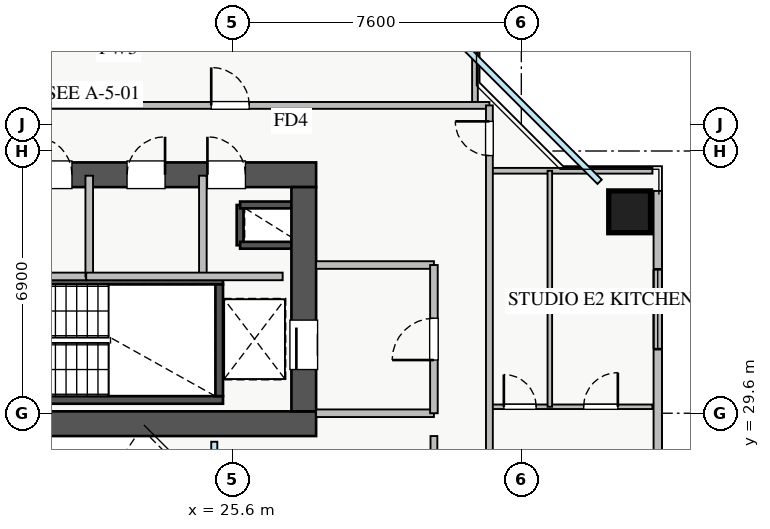
"""IFC4 building model, lengths in metres.
Left out: names, types, materials, properties, quantities, classifications, styles, units other than length and angle.
Written with IfcOpenShell. Run it as: python <this file> out.ifc"""

import sys

from ifc_helpers import new_model, si_unit, direction, frame, frame_2d, origin, origin_2d, place, context, subcontext, project, spatial, rectangle, extrude, source, transform, mapped, element, fill, save


model = new_model("IFC4")
c1 = context("Model", 3, precision=1e-05, world=origin(), true_north=direction((0.0, 1.0)))
c2 = subcontext(c1, "Body", "Model", "MODEL_VIEW")
j1 = project(units=[si_unit("LENGTHUNIT", "METRE"), si_unit("PLANEANGLEUNIT", "RADIAN")], contexts=[c1])
p1 = place(None, origin())
s1 = spatial("IfcSite", under=j1, at=p1, CompositionType="ELEMENT")
p2 = place(p1, origin())
s2 = spatial("IfcBuilding", under=s1, at=p2, CompositionType="ELEMENT")
p3 = place(p2, frame((0.0, 0.0, 106.75)))
s3 = spatial("IfcBuildingStorey", under=s2, at=p3, CompositionType="ELEMENT", Elevation=106.75)
p4 = place(p3, frame((25.8, 34.02, 0.0), z_axis=(0.0, 0.0, 1.0), x_axis=(0.0, 1.0, 0.0)))
e1 = element("IfcWall", 1, at=p4, inside=s3, PredefinedType="SHEAR", context=c2, shape_type="SweptSolid", body=[
    extrude(rectangle(XDim=1.06, YDim=0.18, at=frame_2d((0.53, 0.0))), origin(), (0.0, 0.0, 1.0), 3.07),
])
for number, where, z_axis, x_axis in (
    (2, (25.8, 35.08, 0.0), (0.0, 0.0, 1.0), (1.0, 0.0, 0.0)),
    (3, (25.8, 34.02, 0.0), (0.0, 0.0, 1.0), (1.0, 0.0, 0.0)),
):
    element("IfcWall", number, at=place(p3, frame(where, z_axis=z_axis, x_axis=x_axis)), inside=s3, PredefinedType="SHEAR", context=c2, shape_type="SweptSolid", body=[
        extrude(rectangle(XDim=1.35, YDim=0.18, at=frame_2d((0.675, 0.0))), origin(), (0.0, 0.0, 1.0), 3.07),
    ])
p5 = place(p3, frame((18.2, 29.95, 0.0), z_axis=(0.0, 0.0, 1.0), x_axis=(1.0, 0.0, 0.0)))
e4 = element("IfcWall", 4, at=p5, inside=s3, PredefinedType="SHEAR", context=c2, shape_type="SweptSolid", body=[
    extrude(rectangle(XDim=7.15, YDim=0.2, at=frame_2d((3.575, 0.0))), origin(), (0.0, 0.0, 1.0), 3.25),
])
p6 = place(p3, frame((18.2, 33.09, 0.0), z_axis=(0.0, 0.0, 1.0), x_axis=(1.0, 0.0, 0.0)))
e5 = element("IfcWall", 5, at=p6, inside=s3, PredefinedType="SHEAR", context=c2, shape_type="SweptSolid", body=[
    extrude(rectangle(XDim=7.15, YDim=0.2, at=frame_2d((3.575, 0.0))), origin(), (0.0, 0.0, 1.0), 3.25),
])
p7 = place(p6, frame((0.35, 0.0, 0.0)))
e6 = element("IfcOpeningElement", 6, at=p7, cuts=e5, PredefinedType="OPENING", context=c2, shape_type="SweptSolid", body=[
    extrude(rectangle(XDim=1.1, YDim=2.05, at=frame_2d((0.55, 1.025))), frame((0.0, 0.11, 0.0), z_axis=(0.0, -1.0, 0.0), x_axis=(1.0, 0.0, 0.0)), (0.0, 0.0, 1.0), 0.22),
])
p8 = place(p3, frame((25.25, 30.05, 0.0), z_axis=(0.0, 0.0, 1.0), x_axis=(0.0, 1.0, 0.0)))
e7 = element("IfcWall", 7, at=p8, inside=s3, PredefinedType="SHEAR", context=c2, shape_type="SweptSolid", body=[
    extrude(rectangle(XDim=2.94, YDim=0.2, at=frame_2d((1.47, 0.0))), origin(), (0.0, 0.0, 1.0), 3.25),
])
p9 = place(p3, frame((10.2, 29.325, 0.0), z_axis=(0.0, 0.0, 1.0), x_axis=(1.0, 0.0, 0.0)))
e8 = element("IfcWall", 8, at=p9, inside=s3, PredefinedType="SHEAR", context=c2, shape_type="SweptSolid", body=[
    extrude(rectangle(XDim=17.6, YDim=0.65, at=frame_2d((8.8, 0.0))), origin(), (0.0, 0.0, 1.0), 3.25),
])
p10 = place(p3, frame((10.2, 35.875, 0.0), z_axis=(0.0, 0.0, 1.0), x_axis=(1.0, 0.0, 0.0)))
e9 = element("IfcWall", 9, at=p10, inside=s3, PredefinedType="SHEAR", context=c2, shape_type="SweptSolid", body=[
    extrude(rectangle(XDim=17.6, YDim=0.65, at=frame_2d((8.8, 0.0))), origin(), (0.0, 0.0, 1.0), 3.25),
])
p11 = place(p10, frame((1.15, 0.0, 0.0)))
e10 = element("IfcOpeningElement", 10, at=p11, cuts=e9, PredefinedType="OPENING", context=c2, shape_type="SweptSolid", body=[
    extrude(rectangle(XDim=1.1, YDim=2.05, at=frame_2d((0.55, 1.025))), frame((0.0, 0.335, 0.0), z_axis=(0.0, -1.0, 0.0), x_axis=(1.0, 0.0, 0.0)), (0.0, 0.0, 1.0), 0.67),
])
p12 = place(p10, frame((8.3, 0.0, 0.0)))
e11 = element("IfcOpeningElement", 11, at=p12, cuts=e9, PredefinedType="OPENING", context=c2, shape_type="SweptSolid", body=[
    extrude(rectangle(XDim=1.1, YDim=2.05, at=frame_2d((0.55, 1.025))), frame((0.0, 0.335, 0.0), z_axis=(0.0, -1.0, 0.0), x_axis=(1.0, 0.0, 0.0)), (0.0, 0.0, 1.0), 0.67),
])
p13 = place(p10, frame((4.9, 0.0, 0.0)))
e12 = element("IfcOpeningElement", 12, at=p13, cuts=e9, PredefinedType="OPENING", context=c2, shape_type="SweptSolid", body=[
    extrude(rectangle(XDim=1.1, YDim=2.05, at=frame_2d((0.55, 1.025))), frame((0.0, 0.335, 0.0), z_axis=(0.0, -1.0, 0.0), x_axis=(1.0, 0.0, 0.0)), (0.0, 0.0, 1.0), 0.67),
])
p14 = place(p10, frame((14.74, 0.0, 0.0)))
e13 = element("IfcOpeningElement", 13, at=p14, cuts=e9, PredefinedType="OPENING", context=c2, shape_type="SweptSolid", body=[
    extrude(rectangle(XDim=1.0, YDim=2.05, at=frame_2d((0.5, 1.025))), frame((0.0, 0.335, 0.0), z_axis=(0.0, -1.0, 0.0), x_axis=(1.0, 0.0, 0.0)), (0.0, 0.0, 1.0), 0.67),
])
p15 = place(p10, frame((10.175, 0.0, 0.0)))
e14 = element("IfcOpeningElement", 14, at=p15, cuts=e9, PredefinedType="OPENING", context=c2, shape_type="SweptSolid", body=[
    extrude(rectangle(XDim=1.0, YDim=2.05, at=frame_2d((0.5, 1.025))), frame((0.0, 0.335, 0.0), z_axis=(0.0, -1.0, 0.0), x_axis=(1.0, 0.0, 0.0)), (0.0, 0.0, 1.0), 0.67),
])
p16 = place(p10, frame((12.625, 0.0, 0.0)))
e15 = element("IfcOpeningElement", 15, at=p16, cuts=e9, PredefinedType="OPENING", context=c2, shape_type="SweptSolid", body=[
    extrude(rectangle(XDim=1.0, YDim=2.05, at=frame_2d((0.5, 1.025))), frame((0.0, 0.335, 0.0), z_axis=(0.0, -1.0, 0.0), x_axis=(1.0, 0.0, 0.0)), (0.0, 0.0, 1.0), 0.67),
])
p17 = place(p3, frame((27.475, 29.65, 0.0), z_axis=(0.0, 0.0, 1.0), x_axis=(0.0, 1.0, 0.0)))
e16 = element("IfcWall", 16, at=p17, inside=s3, PredefinedType="SHEAR", context=c2, shape_type="SweptSolid", body=[
    extrude(rectangle(XDim=5.9, YDim=0.65, at=frame_2d((2.95, 0.0))), origin(), (0.0, 0.0, 1.0), 3.25),
])
p18 = place(p17, frame((1.1, 0.0, 0.0)))
e17 = element("IfcOpeningElement", 17, at=p18, cuts=e16, PredefinedType="OPENING", context=c2, shape_type="SweptSolid", body=[
    extrude(rectangle(XDim=1.3, YDim=2.05, at=frame_2d((0.65, 1.025))), frame((0.0, 0.335, 0.0), z_axis=(0.0, -1.0, 0.0), x_axis=(1.0, 0.0, 0.0)), (0.0, 0.0, 1.0), 0.67),
])
m1 = source(origin(), c2, "Body", "SweptSolid", [
    extrude(rectangle(XDim=1.1, YDim=1.1, at=origin_2d()), origin(), (0.0, 0.0, 1.0), 3.25),
])
p19 = place(p3, frame((36.05, 34.9, 0.0), z_axis=(0.0, 0.0, 1.0), x_axis=(1.0, 0.0, 0.0)))
e18 = element("IfcColumn", 18, at=p19, inside=s3, PredefinedType="COLUMN", context=c2, shape_type="MappedRepresentation", body=[
    mapped(m1, transform((0.0, 0.0, 0.0), x_axis=(1.0, 0.0, 0.0), y_axis=(0.0, 1.0, 0.0), z_axis=(0.0, 0.0, 1.0), scale=1.0)),
])
p20 = place(p3, frame((36.79, 10.55, 0.0), z_axis=(0.0, 0.0, 1.0), x_axis=(0.0, 1.0, 0.0)))
e19 = element("IfcWall", 19, at=p20, inside=s3, PredefinedType="STANDARD", context=c2, shape_type="SweptSolid", body=[
    extrude(rectangle(XDim=24.9, YDim=0.22, at=frame_2d((12.45, 0.0))), origin(), (0.0, 0.0, 1.0), 2.61),
])
p21 = place(p20, frame((13.3, 0.0, 0.0)))
e20 = element("IfcOpeningElement", 20, at=p21, cuts=e19, PredefinedType="OPENING", context=c2, shape_type="SweptSolid", body=[
    extrude(rectangle(XDim=1.2, YDim=2.1, at=frame_2d((0.6, 1.05))), frame((0.0, 0.12, 0.0), z_axis=(0.0, -1.0, 0.0), x_axis=(1.0, 0.0, 0.0)), (0.0, 0.0, 1.0), 0.24),
])
p22 = place(p20, frame((1.912, 0.0, 0.9)))
e21 = element("IfcOpeningElement", 21, at=p22, cuts=e19, PredefinedType="OPENING", context=c2, shape_type="SweptSolid", body=[
    extrude(rectangle(XDim=2.4, YDim=1.48, at=frame_2d((1.2, 0.74))), frame((0.0, 0.12, 0.0), z_axis=(0.0, -1.0, 0.0), x_axis=(1.0, 0.0, 0.0)), (0.0, 0.0, 1.0), 0.24),
])
p23 = place(p20, frame((20.737, 0.0, 0.9)))
e22 = element("IfcOpeningElement", 22, at=p23, cuts=e19, PredefinedType="OPENING", context=c2, shape_type="SweptSolid", body=[
    extrude(rectangle(XDim=2.1, YDim=1.48, at=frame_2d((1.05, 0.74))), frame((0.0, 0.12, 0.0), z_axis=(0.0, -1.0, 0.0), x_axis=(1.0, 0.0, 0.0)), (0.0, 0.0, 1.0), 0.24),
])
p24 = place(p20, frame((12.165, 0.0, 0.9)))
e23 = element("IfcOpeningElement", 23, at=p24, cuts=e19, PredefinedType="OPENING", context=c2, shape_type="SweptSolid", body=[
    extrude(rectangle(XDim=0.9, YDim=1.2, at=frame_2d((0.45, 0.6))), frame((0.0, 0.12, 0.0), z_axis=(0.0, -1.0, 0.0), x_axis=(1.0, 0.0, 0.0)), (0.0, 0.0, 1.0), 0.24),
])
for number, where, z_axis, x_axis in (
    (24, (27.8, 29.6, 0.0), (0.0, 0.0, 1.0), (1.0, 0.0, 0.0)),
    (25, (27.8, 33.5, 0.0), (0.0, 0.0, 1.0), (1.0, 0.0, 0.0)),
):
    element("IfcWall", number, at=place(p3, frame(where, z_axis=z_axis, x_axis=x_axis)), inside=s3, PredefinedType="PARTITIONING", context=c2, shape_type="SweptSolid", body=[
        extrude(rectangle(XDim=3.1, YDim=0.2, at=frame_2d((1.55, 0.0))), origin(), (0.0, 0.0, 1.0), 3.07),
    ])
p25 = place(p3, frame((30.9, 29.6, 0.0), z_axis=(0.0, 0.0, 1.0), x_axis=(0.0, 1.0, 0.0)))
e26 = element("IfcWall", 26, at=p25, inside=s3, PredefinedType="PARTITIONING", context=c2, shape_type="SweptSolid", body=[
    extrude(rectangle(XDim=3.9, YDim=0.2, at=frame_2d((1.95, 0.0))), origin(), (0.0, 0.0, 1.0), 3.07),
])
p26 = place(p25, frame((1.4, 0.0, 0.0)))
e27 = element("IfcOpeningElement", 27, at=p26, cuts=e26, PredefinedType="OPENING", context=c2, shape_type="SweptSolid", body=[
    extrude(rectangle(XDim=1.1, YDim=2.05, at=frame_2d((0.55, 1.025))), frame((0.0, 0.11, 0.0), z_axis=(0.0, -1.0, 0.0), x_axis=(1.0, 0.0, 0.0)), (0.0, 0.0, 1.0), 0.22),
])
p27 = place(p3, frame((24.82, 33.2, 0.0), z_axis=(0.0, 0.0, 1.0), x_axis=(0.0, 1.0, 0.0)))
e28 = element("IfcWall", 28, at=p27, inside=s3, PredefinedType="PARTITIONING", context=c2, shape_type="SweptSolid", body=[
    extrude(rectangle(XDim=2.65, YDim=0.2, at=frame_2d((1.325, 0.0))), origin(), (0.0, 0.0, 1.0), 3.07),
])
p28 = place(p3, frame((19.88, 33.2, 0.0), z_axis=(0.0, 0.0, 1.0), x_axis=(1.0, 0.0, 0.0)))
e29 = element("IfcWall", 29, at=p28, inside=s3, PredefinedType="PARTITIONING", context=c2, shape_type="SweptSolid", body=[
    extrude(rectangle(XDim=1.87, YDim=0.2, at=frame_2d((0.935, 0.0))), origin(), (0.0, 0.0, 1.0), 3.07),
])
p29 = place(p3, frame((21.83, 33.2, 0.0), z_axis=(0.0, 0.0, 1.0), x_axis=(0.0, 1.0, 0.0)))
e30 = element("IfcWall", 30, at=p29, inside=s3, PredefinedType="PARTITIONING", context=c2, shape_type="SweptSolid", body=[
    extrude(rectangle(XDim=2.65, YDim=0.2, at=frame_2d((1.325, 0.0))), origin(), (0.0, 0.0, 1.0), 3.07),
])
p30 = place(p3, frame((21.75, 33.2, 0.0), z_axis=(0.0, 0.0, 1.0), x_axis=(1.0, 0.0, 0.0)))
e31 = element("IfcWall", 31, at=p30, inside=s3, PredefinedType="PARTITIONING", context=c2, shape_type="SweptSolid", body=[
    extrude(rectangle(XDim=5.17, YDim=0.2, at=frame_2d((2.585, 0.0))), origin(), (0.0, 0.0, 1.0), 3.07),
])
p31 = place(p3, frame((31.98, 37.7, 0.0), z_axis=(0.0, 0.0, 1.0), x_axis=(0.0, 1.0, 0.0)))
e32 = element("IfcWall", 32, at=p31, inside=s3, PredefinedType="PARTITIONING", context=c2, shape_type="SweptSolid", body=[
    extrude(rectangle(XDim=2.95, YDim=0.15, at=frame_2d((1.475, 0.0))), origin(), (0.0, 0.0, 1.0), 3.07),
])
p32 = place(p3, frame((8.75, 37.7, 0.0), z_axis=(0.0, 0.0, 1.0), x_axis=(1.0, 0.0, 0.0)))
e33 = element("IfcWall", 33, at=p32, inside=s3, PredefinedType="PARTITIONING", context=c2, shape_type="SweptSolid", body=[
    extrude(rectangle(XDim=23.61, YDim=0.18, at=frame_2d((11.805, 0.0))), origin(), (0.0, 0.0, 1.0), 3.07),
])
p33 = place(p32, frame((4.675, 0.0, 0.0)))
e34 = element("IfcOpeningElement", 34, at=p33, cuts=e33, PredefinedType="OPENING", context=c2, shape_type="SweptSolid", body=[
    extrude(rectangle(XDim=1.0, YDim=2.05, at=frame_2d((0.5, 1.025))), frame((0.0, 0.1, 0.0), z_axis=(0.0, -1.0, 0.0), x_axis=(1.0, 0.0, 0.0)), (0.0, 0.0, 1.0), 0.2),
])
p34 = place(p32, frame((16.29, 0.0, 0.0)))
e35 = element("IfcOpeningElement", 35, at=p34, cuts=e33, PredefinedType="OPENING", context=c2, shape_type="SweptSolid", body=[
    extrude(rectangle(XDim=1.0, YDim=2.05, at=frame_2d((0.5, 1.025))), frame((0.0, 0.1, 0.0), z_axis=(0.0, -1.0, 0.0), x_axis=(1.0, 0.0, 0.0)), (0.0, 0.0, 1.0), 0.2),
])
p35 = place(p3, frame((32.36, 35.98, 0.0), z_axis=(0.0, 0.0, 1.0), x_axis=(1.0, 0.0, 0.0)))
e36 = element("IfcWall", 36, at=p35, inside=s3, PredefinedType="PARTITIONING", context=c2, shape_type="SweptSolid", body=[
    extrude(rectangle(XDim=4.29, YDim=0.15, at=frame_2d((2.145, 0.0))), origin(), (0.0, 0.0, 1.0), 3.07),
])
p36 = place(p3, frame((32.36, 29.77, 0.0), z_axis=(0.0, 0.0, 1.0), x_axis=(1.0, 0.0, 0.0)))
e37 = element("IfcWall", 37, at=p36, inside=s3, PredefinedType="PLUMBINGWALL", context=c2, shape_type="SweptSolid", body=[
    extrude(rectangle(XDim=4.29, YDim=0.12, at=frame_2d((2.145, 0.0))), origin(), (0.0, 0.0, 1.0), 3.07),
])
p37 = place(p36, frame((0.38, 0.0, 0.0)))
e38 = element("IfcOpeningElement", 38, at=p37, cuts=e37, PredefinedType="OPENING", context=c2, shape_type="SweptSolid", body=[
    extrude(rectangle(XDim=0.85, YDim=2.05, at=frame_2d((0.425, 1.025))), frame((0.0, 0.07, 0.0), z_axis=(0.0, -1.0, 0.0), x_axis=(1.0, 0.0, 0.0)), (0.0, 0.0, 1.0), 0.14),
])
p38 = place(p36, frame((2.48, 0.0, 0.0)))
e39 = element("IfcOpeningElement", 39, at=p38, cuts=e37, PredefinedType="OPENING", context=c2, shape_type="SweptSolid", body=[
    extrude(rectangle(XDim=0.9, YDim=2.05, at=frame_2d((0.45, 1.025))), frame((0.0, 0.07, 0.0), z_axis=(0.0, -1.0, 0.0), x_axis=(1.0, 0.0, 0.0)), (0.0, 0.0, 1.0), 0.14),
])
p39 = place(p3, frame((33.95, 29.77, 0.0), z_axis=(0.0, 0.0, 1.0), x_axis=(0.0, 1.0, 0.0)))
e40 = element("IfcWall", 40, at=p39, inside=s3, PredefinedType="PLUMBINGWALL", context=c2, shape_type="SweptSolid", body=[
    extrude(rectangle(XDim=6.21, YDim=0.12, at=frame_2d((3.105, 0.0))), origin(), (0.0, 0.0, 1.0), 3.07),
])
p40 = place(p3, frame((32.36, 8.3, 0.0), z_axis=(0.0, 0.0, 1.0), x_axis=(0.0, 1.0, 0.0)))
e41 = element("IfcWall", 41, at=p40, inside=s3, PredefinedType="PARTITIONING", context=c2, shape_type="SweptSolid", body=[
    extrude(rectangle(XDim=29.4, YDim=0.18, at=frame_2d((14.7, 0.0))), origin(), (0.0, 0.0, 1.0), 3.07),
])
p41 = place(p40, frame((28.08, 0.0, 0.0)))
e42 = element("IfcOpeningElement", 42, at=p41, cuts=e41, PredefinedType="OPENING", context=c2, shape_type="SweptSolid", body=[
    extrude(rectangle(XDim=0.9, YDim=2.05, at=frame_2d((0.45, 1.025))), frame((0.0, 0.1, 0.0), z_axis=(0.0, -1.0, 0.0), x_axis=(1.0, 0.0, 0.0)), (0.0, 0.0, 1.0), 0.2),
])
p42 = place(p40, frame((0.42, 0.0, 0.0)))
e43 = element("IfcOpeningElement", 43, at=p42, cuts=e41, PredefinedType="OPENING", context=c2, shape_type="SweptSolid", body=[
    extrude(rectangle(XDim=0.9, YDim=2.05, at=frame_2d((0.45, 1.025))), frame((0.0, 0.1, 0.0), z_axis=(0.0, -1.0, 0.0), x_axis=(1.0, 0.0, 0.0)), (0.0, 0.0, 1.0), 0.2),
])
p43 = place(p40, frame((4.395, 0.0, 0.0)))
e44 = element("IfcOpeningElement", 44, at=p43, cuts=e41, PredefinedType="OPENING", context=c2, shape_type="SweptSolid", body=[
    extrude(rectangle(XDim=1.0, YDim=2.05, at=frame_2d((0.5, 1.025))), frame((0.0, 0.1, 0.0), z_axis=(0.0, -1.0, 0.0), x_axis=(1.0, 0.0, 0.0)), (0.0, 0.0, 1.0), 0.2),
])
p44 = place(p40, frame((17.135, 0.0, 0.0)))
e45 = element("IfcOpeningElement", 45, at=p44, cuts=e41, PredefinedType="OPENING", context=c2, shape_type="SweptSolid", body=[
    extrude(rectangle(XDim=1.0, YDim=2.05, at=frame_2d((0.5, 1.025))), frame((0.0, 0.1, 0.0), z_axis=(0.0, -1.0, 0.0), x_axis=(1.0, 0.0, 0.0)), (0.0, 0.0, 1.0), 0.2),
])
p45 = place(p3, frame((30.9, 17.0, 0.0), z_axis=(0.0, 0.0, 1.0), x_axis=(0.0, 1.0, 0.0)))
e46 = element("IfcWall", 46, at=p45, inside=s3, PredefinedType="PARTITIONING", context=c2, shape_type="SweptSolid", body=[
    extrude(rectangle(XDim=12.0, YDim=0.18, at=frame_2d((6.0, 0.0))), origin(), (0.0, 0.0, 1.0), 3.07),
])
p46 = place(p45, frame((1.4, 0.0, 0.0)))
e47 = element("IfcOpeningElement", 47, at=p46, cuts=e46, PredefinedType="OPENING", context=c2, shape_type="SweptSolid", body=[
    extrude(rectangle(XDim=1.0, YDim=2.05, at=frame_2d((0.5, 1.025))), frame((0.0, 0.1, 0.0), z_axis=(0.0, -1.0, 0.0), x_axis=(1.0, 0.0, 0.0)), (0.0, 0.0, 1.0), 0.2),
])
p47 = place(p45, frame((5.4, 0.0, 0.0)))
e48 = element("IfcOpeningElement", 48, at=p47, cuts=e46, PredefinedType="OPENING", context=c2, shape_type="SweptSolid", body=[
    extrude(rectangle(XDim=1.0, YDim=2.05, at=frame_2d((0.5, 1.025))), frame((0.0, 0.1, 0.0), z_axis=(0.0, -1.0, 0.0), x_axis=(1.0, 0.0, 0.0)), (0.0, 0.0, 1.0), 0.2),
])
p48 = place(p45, frame((9.4, 0.0, 0.0)))
e49 = element("IfcOpeningElement", 49, at=p48, cuts=e46, PredefinedType="OPENING", context=c2, shape_type="SweptSolid", body=[
    extrude(rectangle(XDim=1.0, YDim=2.05, at=frame_2d((0.5, 1.025))), frame((0.0, 0.1, 0.0), z_axis=(0.0, -1.0, 0.0), x_axis=(1.0, 0.0, 0.0)), (0.0, 0.0, 1.0), 0.2),
])
m2 = source(origin(), c2, "Body", "SweptSolid", [
    extrude(rectangle(XDim=2.1, YDim=1.48, at=frame_2d((1.05, 0.74))), frame((0.0, 0.03, 0.0), z_axis=(0.0, -1.0, 0.0), x_axis=(1.0, 0.0, 0.0)), (0.0, 0.0, 1.0), 0.06),
])
p49 = place(p23, origin())
e50 = element("IfcWindow", 50, at=p49, inside=s3, PartitioningType="TRIPLE_PANEL_VERTICAL", PredefinedType="WINDOW", context=c2, shape_type="MappedRepresentation", body=[
    mapped(m2, transform((0.0, 0.0, 0.0), x_axis=(1.0, 0.0, 0.0), y_axis=(0.0, 1.0, 0.0), z_axis=(0.0, 0.0, 1.0), scale=1.0)),
])
fill(e22, e50)
m3 = source(origin(), c2, "Body", "SweptSolid", [
    extrude(rectangle(XDim=1.3, YDim=2.05, at=frame_2d((0.65, 1.025))), frame((0.0, 0.025, 0.0), z_axis=(0.0, -1.0, 0.0), x_axis=(1.0, 0.0, 0.0)), (0.0, 0.0, 1.0), 0.05),
])
p50 = place(p18, origin())
e51 = element("IfcDoor", 51, at=p50, inside=s3, OperationType="SLIDING_TO_LEFT", PredefinedType="DOOR", context=c2, shape_type="MappedRepresentation", body=[
    mapped(m3, transform((0.0, 0.0, 0.0), x_axis=(1.0, 0.0, 0.0), y_axis=(0.0, 1.0, 0.0), z_axis=(0.0, 0.0, 1.0), scale=1.0)),
])
fill(e17, e51)
m4 = source(origin(), c2, "Body", "SweptSolid", [
    extrude(rectangle(XDim=1.0, YDim=2.05, at=frame_2d((0.5, 1.025))), frame((0.0, 0.025, 0.0), z_axis=(0.0, -1.0, 0.0), x_axis=(1.0, 0.0, 0.0)), (0.0, 0.0, 1.0), 0.05),
])
p51 = place(p14, origin())
e52 = element("IfcDoor", 52, at=p51, inside=s3, OperationType="SINGLE_SWING_LEFT", PredefinedType="DOOR", context=c2, shape_type="MappedRepresentation", body=[
    mapped(m4, transform((0.0, 0.0, 0.0), x_axis=(1.0, 0.0, 0.0), y_axis=(0.0, 1.0, 0.0), z_axis=(0.0, 0.0, 1.0), scale=1.0)),
])
fill(e13, e52)
p52 = place(p15, origin())
e53 = element("IfcDoor", 53, at=p52, inside=s3, OperationType="SINGLE_SWING_LEFT", PredefinedType="DOOR", context=c2, shape_type="MappedRepresentation", body=[
    mapped(m4, transform((0.0, 0.0, 0.0), x_axis=(1.0, 0.0, 0.0), y_axis=(0.0, 1.0, 0.0), z_axis=(0.0, 0.0, 1.0), scale=1.0)),
])
fill(e14, e53)
p53 = place(p16, origin())
e54 = element("IfcDoor", 54, at=p53, inside=s3, OperationType="SINGLE_SWING_RIGHT", PredefinedType="DOOR", context=c2, shape_type="MappedRepresentation", body=[
    mapped(m4, transform((0.0, 0.0, 0.0), x_axis=(1.0, 0.0, 0.0), y_axis=(0.0, 1.0, 0.0), z_axis=(0.0, 0.0, 1.0), scale=1.0)),
])
fill(e15, e54)
m5 = source(origin(), c2, "Body", "SweptSolid", [
    extrude(rectangle(XDim=1.1, YDim=2.05, at=frame_2d((0.55, 1.025))), frame((0.0, 0.025, 0.0), z_axis=(0.0, -1.0, 0.0), x_axis=(1.0, 0.0, 0.0)), (0.0, 0.0, 1.0), 0.05),
])
p54 = place(p26, origin())
e55 = element("IfcDoor", 55, at=p54, inside=s3, OperationType="SINGLE_SWING_LEFT", PredefinedType="DOOR", context=c2, shape_type="MappedRepresentation", body=[
    mapped(m5, transform((0.0, 0.0, 0.0), x_axis=(1.0, 0.0, 0.0), y_axis=(0.0, 1.0, 0.0), z_axis=(0.0, 0.0, 1.0), scale=1.0)),
])
fill(e27, e55)
p55 = place(p34, origin())
e56 = element("IfcDoor", 56, at=p55, inside=s3, OperationType="SINGLE_SWING_LEFT", PredefinedType="DOOR", context=c2, shape_type="MappedRepresentation", body=[
    mapped(m4, transform((0.0, 0.0, 0.0), x_axis=(1.0, 0.0, 0.0), y_axis=(0.0, 1.0, 0.0), z_axis=(0.0, 0.0, 1.0), scale=1.0)),
])
fill(e35, e56)
m6 = source(origin(), c2, "Body", "SweptSolid", [
    extrude(rectangle(XDim=0.85, YDim=2.05, at=frame_2d((0.425, 1.025))), frame((0.0, 0.025, 0.0), z_axis=(0.0, -1.0, 0.0), x_axis=(1.0, 0.0, 0.0)), (0.0, 0.0, 1.0), 0.05),
])
p56 = place(p37, origin())
e57 = element("IfcDoor", 57, at=p56, inside=s3, OperationType="SINGLE_SWING_LEFT", PredefinedType="DOOR", context=c2, shape_type="MappedRepresentation", body=[
    mapped(m6, transform((0.0, 0.0, 0.0), x_axis=(1.0, 0.0, 0.0), y_axis=(0.0, 1.0, 0.0), z_axis=(0.0, 0.0, 1.0), scale=1.0)),
])
fill(e38, e57)
m7 = source(origin(), c2, "Body", "SweptSolid", [
    extrude(rectangle(XDim=0.9, YDim=2.05, at=frame_2d((0.45, 1.025))), frame((0.0, 0.025, 0.0), z_axis=(0.0, -1.0, 0.0), x_axis=(1.0, 0.0, 0.0)), (0.0, 0.0, 1.0), 0.05),
])
p57 = place(p38, origin())
e58 = element("IfcDoor", 58, at=p57, inside=s3, OperationType="SINGLE_SWING_RIGHT", PredefinedType="DOOR", context=c2, shape_type="MappedRepresentation", body=[
    mapped(m7, transform((0.0, 0.0, 0.0), x_axis=(1.0, 0.0, 0.0), y_axis=(0.0, 1.0, 0.0), z_axis=(0.0, 0.0, 1.0), scale=1.0)),
])
fill(e39, e58)
p58 = place(p41, origin())
e59 = element("IfcDoor", 59, at=p58, inside=s3, OperationType="SINGLE_SWING_RIGHT", PredefinedType="DOOR", context=c2, shape_type="MappedRepresentation", body=[
    mapped(m7, transform((0.0, 0.0, 0.0), x_axis=(1.0, 0.0, 0.0), y_axis=(0.0, 1.0, 0.0), z_axis=(0.0, 0.0, 1.0), scale=1.0)),
])
fill(e42, e59)
save(model, sys.argv[1])
